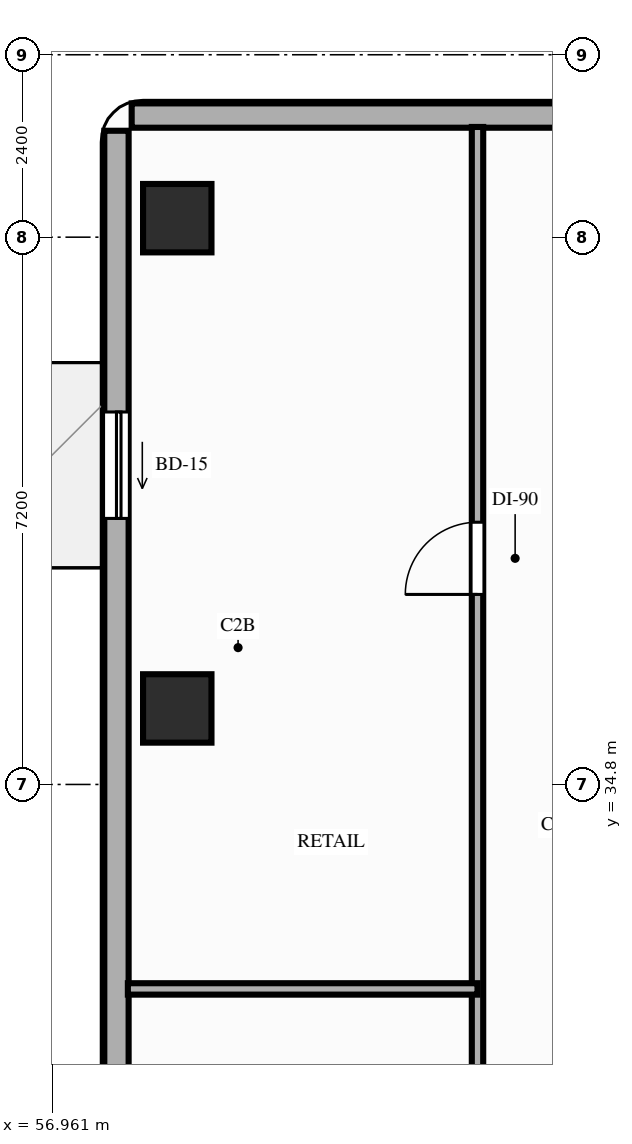
"""IFC4 building model, lengths in metres.
Left out: names, types, materials, properties, quantities, classifications, styles, units other than length and angle.
Written with IfcOpenShell. Run it as: python <this file> out.ifc"""

import sys

from ifc_helpers import new_model, si_unit, direction, frame, frame_2d, origin, origin_2d, place, context, subcontext, project, spatial, rectangle, extrude, element, fill, save


model = new_model("IFC4")
c1 = context("Model", 3, precision=1e-05, world=origin(), true_north=direction((0.0, 1.0)))
c2 = subcontext(c1, "Body", "Model", "MODEL_VIEW")
j1 = project(units=[si_unit("LENGTHUNIT", "METRE"), si_unit("PLANEANGLEUNIT", "RADIAN")], contexts=[c1])
p1 = place(None, origin())
s1 = spatial("IfcSite", under=j1, at=p1, CompositionType="ELEMENT")
p2 = place(p1, origin())
s2 = spatial("IfcBuilding", under=s1, at=p2, CompositionType="ELEMENT")
p3 = place(p2, frame((0.0, 0.0, 66.0)))
s3 = spatial("IfcBuildingStorey", under=s2, at=p3, CompositionType="ELEMENT", Elevation=66.0)
for number, where, z_axis, x_axis in (
    (1, (58.6, 35.8, 0.0), (0.0, 0.0, 1.0), (1.0, 0.0, 0.0)),
    (2, (58.6, 42.25, 0.0), (0.0, 0.0, 1.0), (1.0, 0.0, 0.0)),
):
    element("IfcColumn", number, at=place(p3, frame(where, z_axis=z_axis, x_axis=x_axis)), inside=s3, PredefinedType="COLUMN", context=c2, shape_type="SweptSolid", body=[
        extrude(rectangle(XDim=0.9, YDim=0.9, at=origin_2d()), origin(), (0.0, 0.0, 1.0), 3.2),
    ])
p4 = place(p3, frame((57.8, 43.4, 0.0), z_axis=(0.0, 0.0, 1.0), x_axis=(0.0, -1.0, 0.0)))
e3 = element("IfcWall", 3, at=p4, inside=s3, PredefinedType="STANDARD", context=c2, shape_type="SweptSolid", body=[
    extrude(rectangle(XDim=22.6, YDim=0.32, at=frame_2d((11.3, 0.0))), origin(), (0.0, 0.0, 1.0), 2.6),
])
p5 = place(p4, frame((3.7, 0.0, 0.0)))
e4 = element("IfcOpeningElement", 4, at=p5, cuts=e3, PredefinedType="OPENING", context=c2, shape_type="SweptSolid", body=[
    extrude(rectangle(XDim=1.4, YDim=2.1, at=frame_2d((0.7, 1.05))), frame((0.0, 0.17, 0.0), z_axis=(0.0, -1.0, 0.0), x_axis=(1.0, 0.0, 0.0)), (0.0, 0.0, 1.0), 0.34),
])
p6 = place(p3, frame((72.8, 43.6, 0.0), z_axis=(0.0, 0.0, 1.0), x_axis=(-1.0, 0.0, 0.0)))
e5 = element("IfcWall", 5, at=p6, inside=s3, PredefinedType="STANDARD", context=c2, shape_type="SweptSolid", body=[
    extrude(rectangle(XDim=14.8, YDim=0.32, at=frame_2d((7.4, 0.0))), origin(), (0.0, 0.0, 1.0), 3.02),
])
p7 = place(p3, frame((62.55, 20.75, 0.0), z_axis=(0.0, 0.0, 1.0), x_axis=(0.0, 1.0, 0.0)))
e6 = element("IfcWall", 6, at=p7, inside=s3, PredefinedType="PARTITIONING", context=c2, shape_type="SweptSolid", body=[
    extrude(rectangle(XDim=22.7, YDim=0.15, at=frame_2d((11.35, 0.0))), origin(), (0.0, 0.0, 1.0), 2.6),
])
p8 = place(p7, frame((1.05, 0.0, 0.0)))
e7 = element("IfcOpeningElement", 7, at=p8, cuts=e6, PredefinedType="OPENING", context=c2, shape_type="SweptSolid", body=[
    extrude(rectangle(XDim=0.85, YDim=2.1, at=frame_2d((0.425, 1.05))), frame((0.0, 0.085, 0.0), z_axis=(0.0, -1.0, 0.0), x_axis=(1.0, 0.0, 0.0)), (0.0, 0.0, 1.0), 0.17),
])
p9 = place(p7, frame((3.43, 0.0, 0.0)))
e8 = element("IfcOpeningElement", 8, at=p9, cuts=e6, PredefinedType="OPENING", context=c2, shape_type="SweptSolid", body=[
    extrude(rectangle(XDim=0.95, YDim=2.1, at=frame_2d((0.475, 1.05))), frame((0.0, 0.085, 0.0), z_axis=(0.0, -1.0, 0.0), x_axis=(1.0, 0.0, 0.0)), (0.0, 0.0, 1.0), 0.17),
])
p10 = place(p7, frame((8.15, 0.0, 0.0)))
e9 = element("IfcOpeningElement", 9, at=p10, cuts=e6, PredefinedType="OPENING", context=c2, shape_type="SweptSolid", body=[
    extrude(rectangle(XDim=0.95, YDim=2.15, at=frame_2d((0.475, 1.075))), frame((0.0, 0.085, 0.0), z_axis=(0.0, -1.0, 0.0), x_axis=(1.0, 0.0, 0.0)), (0.0, 0.0, 1.0), 0.17),
])
p11 = place(p7, frame((16.55, 0.0, 0.0)))
e10 = element("IfcOpeningElement", 10, at=p11, cuts=e6, PredefinedType="OPENING", context=c2, shape_type="SweptSolid", body=[
    extrude(rectangle(XDim=0.95, YDim=2.15, at=frame_2d((0.475, 1.075))), frame((0.0, 0.085, 0.0), z_axis=(0.0, -1.0, 0.0), x_axis=(1.0, 0.0, 0.0)), (0.0, 0.0, 1.0), 0.17),
])
p12 = place(p3, frame((57.95, 32.11, 0.0), z_axis=(0.0, 0.0, 1.0), x_axis=(1.0, 0.0, 0.0)))
e11 = element("IfcWall", 11, at=p12, inside=s3, PredefinedType="PARTITIONING", context=c2, shape_type="SweptSolid", body=[
    extrude(rectangle(XDim=4.6, YDim=0.15, at=frame_2d((2.3, 0.0))), origin(), (0.0, 0.0, 1.0), 2.6),
])
p13 = place(p5, origin())
e12 = element("IfcDoor", 12, at=p13, inside=s3, OperationType="SLIDING_TO_RIGHT", PredefinedType="DOOR", context=c2, shape_type="SweptSolid", body=[
    extrude(rectangle(XDim=1.4, YDim=2.1, at=frame_2d((0.7, 1.05))), frame((0.0, 0.025, 0.0), z_axis=(0.0, -1.0, 0.0), x_axis=(1.0, 0.0, 0.0)), (0.0, 0.0, 1.0), 0.05),
])
fill(e4, e12)
p14 = place(p11, origin())
e13 = element("IfcDoor", 13, at=p14, inside=s3, OperationType="SINGLE_SWING_LEFT", PredefinedType="DOOR", context=c2, shape_type="SweptSolid", body=[
    extrude(rectangle(XDim=0.95, YDim=2.15, at=frame_2d((0.475, 1.075))), frame((0.0, 0.025, 0.0), z_axis=(0.0, -1.0, 0.0), x_axis=(1.0, 0.0, 0.0)), (0.0, 0.0, 1.0), 0.05),
])
fill(e10, e13)
save(model, sys.argv[1])
